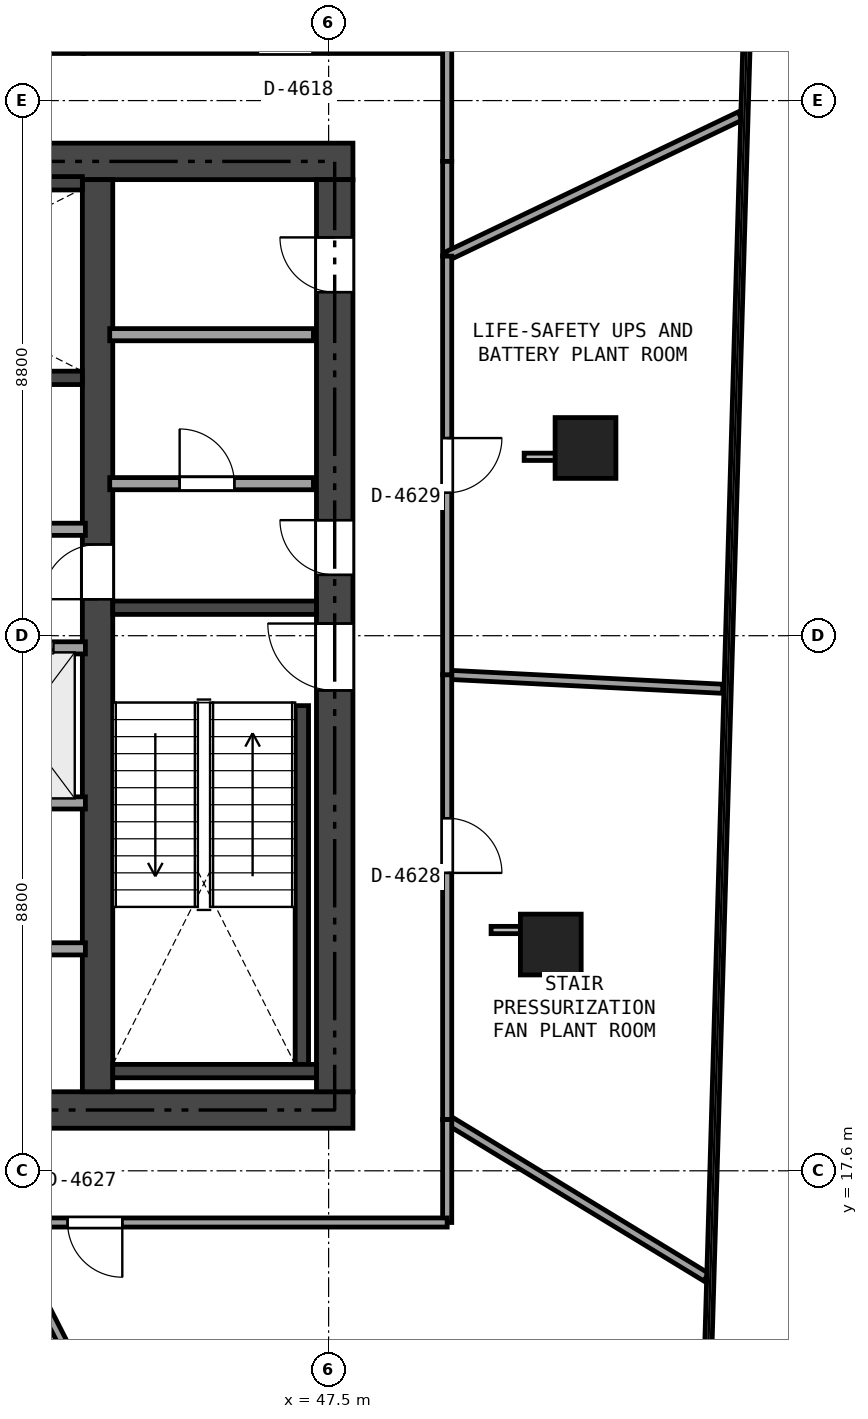
"""IFC4 building model, lengths in metres.
Left out: names, types, materials, properties, quantities, classifications, styles, units other than length and angle.
Written with IfcOpenShell. Run it as: python <this file> out.ifc"""

import sys

from ifc_helpers import new_model, si_unit, direction, frame, frame_2d, origin, origin_2d, place, context, subcontext, project, spatial, rectangle, extrude, element, fill, save


model = new_model("IFC4")
c1 = context("Model", 3, precision=1e-05, world=origin(), true_north=direction((0.0, 1.0)))
c2 = subcontext(c1, "Body", "Model", "MODEL_VIEW")
j1 = project(units=[si_unit("LENGTHUNIT", "METRE"), si_unit("PLANEANGLEUNIT", "RADIAN")], contexts=[c1])
p1 = place(None, origin())
s1 = spatial("IfcSite", under=j1, at=p1, CompositionType="ELEMENT")
p2 = place(p1, origin())
s2 = spatial("IfcBuilding", under=s1, at=p2, CompositionType="ELEMENT")
p3 = place(p2, frame((0.0, 0.0, 172.5)))
s3 = spatial("IfcBuildingStorey", under=s2, at=p3, CompositionType="ELEMENT", Elevation=172.5)
p4 = place(p3, frame((26.5, 18.6, 0.0), z_axis=(0.0, 0.0, 1.0), x_axis=(1.0, 0.0, 0.0)))
e1 = element("IfcWall", 1, at=p4, inside=s3, PredefinedType="SHEAR", context=c2, shape_type="SweptSolid", body=[
    extrude(rectangle(XDim=21.4, YDim=0.6, at=frame_2d((10.7, 0.0))), origin(), (0.0, 0.0, 1.0), 4.08),
])
p5 = place(p4, frame((12.425, 0.0, 0.0)))
e2 = element("IfcOpeningElement", 2, at=p5, cuts=e1, PredefinedType="OPENING", context=c2, shape_type="SweptSolid", body=[
    extrude(rectangle(XDim=1.15, YDim=2.15, at=frame_2d((0.575, 1.075))), frame((0.0, 0.31, 0.0), z_axis=(0.0, -1.0, 0.0), x_axis=(1.0, 0.0, 0.0)), (0.0, 0.0, 1.0), 0.62),
])
p6 = place(p4, frame((5.25, 0.0, 0.0)))
e3 = element("IfcOpeningElement", 3, at=p6, cuts=e1, PredefinedType="OPENING", context=c2, shape_type="SweptSolid", body=[
    extrude(rectangle(XDim=0.9, YDim=2.1, at=frame_2d((0.45, 1.05))), frame((0.0, 0.31, 0.0), z_axis=(0.0, -1.0, 0.0), x_axis=(1.0, 0.0, 0.0)), (0.0, 0.0, 1.0), 0.62),
])
p7 = place(p3, frame((26.5, 34.2, 0.0), z_axis=(0.0, 0.0, 1.0), x_axis=(1.0, 0.0, 0.0)))
e4 = element("IfcWall", 4, at=p7, inside=s3, PredefinedType="SHEAR", context=c2, shape_type="SweptSolid", body=[
    extrude(rectangle(XDim=21.4, YDim=0.6, at=frame_2d((10.7, 0.0))), origin(), (0.0, 0.0, 1.0), 4.08),
])
p8 = place(p7, frame((9.7, 0.0, 0.0)))
e5 = element("IfcOpeningElement", 5, at=p8, cuts=e4, PredefinedType="OPENING", context=c2, shape_type="SweptSolid", body=[
    extrude(rectangle(XDim=1.1, YDim=2.15, at=frame_2d((0.55, 1.075))), frame((0.0, 0.31, 0.0), z_axis=(0.0, -1.0, 0.0), x_axis=(1.0, 0.0, 0.0)), (0.0, 0.0, 1.0), 0.62),
])
p9 = place(p7, frame((1.95, 0.0, 0.0)))
e6 = element("IfcOpeningElement", 6, at=p9, cuts=e4, PredefinedType="OPENING", context=c2, shape_type="SweptSolid", body=[
    extrude(rectangle(XDim=0.9, YDim=2.1, at=frame_2d((0.45, 1.05))), frame((0.0, 0.31, 0.0), z_axis=(0.0, -1.0, 0.0), x_axis=(1.0, 0.0, 0.0)), (0.0, 0.0, 1.0), 0.62),
])
p10 = place(p7, frame((6.25, 0.0, 0.0)))
e7 = element("IfcOpeningElement", 7, at=p10, cuts=e4, PredefinedType="OPENING", context=c2, shape_type="SweptSolid", body=[
    extrude(rectangle(XDim=0.9, YDim=2.1, at=frame_2d((0.45, 1.05))), frame((0.0, 0.31, 0.0), z_axis=(0.0, -1.0, 0.0), x_axis=(1.0, 0.0, 0.0)), (0.0, 0.0, 1.0), 0.62),
])
p11 = place(p3, frame((47.6, 18.9, 0.0), z_axis=(0.0, 0.0, 1.0), x_axis=(0.0, 1.0, 0.0)))
e8 = element("IfcWall", 8, at=p11, inside=s3, PredefinedType="SHEAR", context=c2, shape_type="SweptSolid", body=[
    extrude(rectangle(XDim=15.0, YDim=0.6, at=frame_2d((7.5, 0.0))), origin(), (0.0, 0.0, 1.0), 4.08),
])
p12 = place(p11, frame((6.6, 0.0, 0.0)))
e9 = element("IfcOpeningElement", 9, at=p12, cuts=e8, PredefinedType="OPENING", context=c2, shape_type="SweptSolid", body=[
    extrude(rectangle(XDim=1.1, YDim=2.15, at=frame_2d((0.55, 1.075))), frame((0.0, 0.31, 0.0), z_axis=(0.0, -1.0, 0.0), x_axis=(1.0, 0.0, 0.0)), (0.0, 0.0, 1.0), 0.62),
])
p13 = place(p11, frame((8.5, 0.0, 0.0)))
e10 = element("IfcOpeningElement", 10, at=p13, cuts=e8, PredefinedType="OPENING", context=c2, shape_type="SweptSolid", body=[
    extrude(rectangle(XDim=0.9, YDim=2.1, at=frame_2d((0.45, 1.05))), frame((0.0, 0.31, 0.0), z_axis=(0.0, -1.0, 0.0), x_axis=(1.0, 0.0, 0.0)), (0.0, 0.0, 1.0), 0.62),
])
p14 = place(p11, frame((13.15, 0.0, 0.0)))
e11 = element("IfcOpeningElement", 11, at=p14, cuts=e8, PredefinedType="OPENING", context=c2, shape_type="SweptSolid", body=[
    extrude(rectangle(XDim=0.9, YDim=2.1, at=frame_2d((0.45, 1.05))), frame((0.0, 0.31, 0.0), z_axis=(0.0, -1.0, 0.0), x_axis=(1.0, 0.0, 0.0)), (0.0, 0.0, 1.0), 0.62),
])
p15 = place(p3, frame((43.7, 18.9, 0.0), z_axis=(0.0, 0.0, 1.0), x_axis=(0.0, 1.0, 0.0)))
e12 = element("IfcWall", 12, at=p15, inside=s3, PredefinedType="SHEAR", context=c2, shape_type="SweptSolid", body=[
    extrude(rectangle(XDim=15.0, YDim=0.5, at=frame_2d((7.5, 0.0))), origin(), (0.0, 0.0, 1.0), 4.08),
])
p16 = place(p15, frame((8.1, 0.0, 0.0)))
e13 = element("IfcOpeningElement", 13, at=p16, cuts=e12, PredefinedType="OPENING", context=c2, shape_type="SweptSolid", body=[
    extrude(rectangle(XDim=0.9, YDim=2.1, at=frame_2d((0.45, 1.05))), frame((0.0, 0.26, 0.0), z_axis=(0.0, -1.0, 0.0), x_axis=(1.0, 0.0, 0.0)), (0.0, 0.0, 1.0), 0.52),
])
p17 = place(p3, frame((43.95, 26.86, 0.0), z_axis=(0.0, 0.0, 1.0), x_axis=(1.0, 0.0, 0.0)))
e14 = element("IfcWall", 14, at=p17, inside=s3, PredefinedType="SHEAR", context=c2, shape_type="SweptSolid", body=[
    extrude(rectangle(XDim=3.35, YDim=0.22, at=frame_2d((1.675, 0.0))), origin(), (0.0, 0.0, 1.0), 4.08),
])
p18 = place(p3, frame((47.06, 19.35, 0.0), z_axis=(0.0, 0.0, 1.0), x_axis=(0.0, 1.0, 0.0)))
e15 = element("IfcWall", 15, at=p18, inside=s3, PredefinedType="SHEAR", context=c2, shape_type="SweptSolid", body=[
    extrude(rectangle(XDim=5.9, YDim=0.22, at=frame_2d((2.95, 0.0))), origin(), (0.0, 0.0, 1.0), 4.08),
])
p19 = place(p3, frame((43.95, 19.24, 0.0), z_axis=(0.0, 0.0, 1.0), x_axis=(1.0, 0.0, 0.0)))
e16 = element("IfcWall", 16, at=p19, inside=s3, PredefinedType="SHEAR", context=c2, shape_type="SweptSolid", body=[
    extrude(rectangle(XDim=3.35, YDim=0.22, at=frame_2d((1.675, 0.0))), origin(), (0.0, 0.0, 1.0), 4.08),
])
p20 = place(p3, frame((35.84, 30.64, 0.0), z_axis=(0.0, 0.0, 1.0), x_axis=(1.0, 0.0, 0.0)))
e17 = element("IfcWall", 17, at=p20, inside=s3, PredefinedType="SHEAR", context=c2, shape_type="SweptSolid", body=[
    extrude(rectangle(XDim=7.61, YDim=0.22, at=frame_2d((3.805, 0.0))), origin(), (0.0, 0.0, 1.0), 4.08),
])
p21 = place(p3, frame((37.55, 33.84, 0.0), z_axis=(0.0, 0.0, 1.0), x_axis=(1.0, 0.0, 0.0)))
e18 = element("IfcWall", 18, at=p21, inside=s3, PredefinedType="SHEAR", context=c2, shape_type="SweptSolid", body=[
    extrude(rectangle(XDim=5.9, YDim=0.22, at=frame_2d((2.95, 0.0))), origin(), (0.0, 0.0, 1.0), 4.08),
])
for number, where, z_axis, x_axis in (
    (19, (51.725, 29.487, 0.0), (0.0, 0.0, 1.0), (1.0, 0.0, 0.0)),
    (20, (51.154, 21.321, 0.0), (0.0, 0.0, 1.0), (1.0, 0.0, 0.0)),
):
    element("IfcColumn", number, at=place(p3, frame(where, z_axis=z_axis, x_axis=x_axis)), inside=s3, PredefinedType="COLUMN", context=c2, shape_type="SweptSolid", body=[
        extrude(rectangle(XDim=1.0, YDim=1.0, at=origin_2d()), origin(), (0.0, 0.0, 1.0), 4.08),
    ])
p22 = place(p3, frame((43.9, 28.9, 0.0), z_axis=(0.0, 0.0, 1.0), x_axis=(1.0, 0.0, 0.0)))
e21 = element("IfcWall", 21, at=p22, inside=s3, PredefinedType="SOLIDWALL", context=c2, shape_type="SweptSolid", body=[
    extrude(rectangle(XDim=3.35, YDim=0.2, at=frame_2d((1.675, 0.0))), origin(), (0.0, 0.0, 1.0), 4.08),
])
p23 = place(p22, frame((1.15, 0.0, 0.0)))
e22 = element("IfcOpeningElement", 22, at=p23, cuts=e21, PredefinedType="OPENING", context=c2, shape_type="SweptSolid", body=[
    extrude(rectangle(XDim=0.9, YDim=2.1, at=frame_2d((0.45, 1.05))), frame((0.0, 0.11, 0.0), z_axis=(0.0, -1.0, 0.0), x_axis=(1.0, 0.0, 0.0)), (0.0, 0.0, 1.0), 0.22),
])
p24 = place(p3, frame((43.9, 31.35, 0.0), z_axis=(0.0, 0.0, 1.0), x_axis=(1.0, 0.0, 0.0)))
e23 = element("IfcWall", 23, at=p24, inside=s3, PredefinedType="SOLIDWALL", context=c2, shape_type="SweptSolid", body=[
    extrude(rectangle(XDim=3.35, YDim=0.2, at=frame_2d((1.675, 0.0))), origin(), (0.0, 0.0, 1.0), 4.08),
])
p25 = place(p3, frame((35.62, 28.15, 0.0), z_axis=(0.0, 0.0, 1.0), x_axis=(1.0, 0.0, 0.0)))
e24 = element("IfcWall", 24, at=p25, inside=s3, PredefinedType="SOLIDWALL", context=c2, shape_type="SweptSolid", body=[
    extrude(rectangle(XDim=7.88, YDim=0.2, at=frame_2d((3.94, 0.0))), origin(), (0.0, 0.0, 1.0), 4.08),
])
p26 = place(p3, frame((35.62, 26.2, 0.0), z_axis=(0.0, 0.0, 1.0), x_axis=(1.0, 0.0, 0.0)))
e25 = element("IfcWall", 25, at=p26, inside=s3, PredefinedType="SOLIDWALL", context=c2, shape_type="SweptSolid", body=[
    extrude(rectangle(XDim=7.88, YDim=0.2, at=frame_2d((3.94, 0.0))), origin(), (0.0, 0.0, 1.0), 4.08),
])
p27 = place(p26, frame((0.405, 0.0, 0.0)))
e26 = element("IfcOpeningElement", 26, at=p27, cuts=e25, PredefinedType="OPENING", context=c2, shape_type="SweptSolid", body=[
    extrude(rectangle(XDim=1.1, YDim=2.15, at=frame_2d((0.55, 1.075))), frame((0.0, 0.11, 0.0), z_axis=(0.0, -1.0, 0.0), x_axis=(1.0, 0.0, 0.0)), (0.0, 0.0, 1.0), 0.22),
])
p28 = place(p26, frame((2.355, 0.0, 0.0)))
e27 = element("IfcOpeningElement", 27, at=p28, cuts=e25, PredefinedType="OPENING", context=c2, shape_type="SweptSolid", body=[
    extrude(rectangle(XDim=1.1, YDim=2.15, at=frame_2d((0.55, 1.075))), frame((0.0, 0.11, 0.0), z_axis=(0.0, -1.0, 0.0), x_axis=(1.0, 0.0, 0.0)), (0.0, 0.0, 1.0), 0.22),
])
p29 = place(p26, frame((4.305, 0.0, 0.0)))
e28 = element("IfcOpeningElement", 28, at=p29, cuts=e25, PredefinedType="OPENING", context=c2, shape_type="SweptSolid", body=[
    extrude(rectangle(XDim=1.1, YDim=2.15, at=frame_2d((0.55, 1.075))), frame((0.0, 0.11, 0.0), z_axis=(0.0, -1.0, 0.0), x_axis=(1.0, 0.0, 0.0)), (0.0, 0.0, 1.0), 0.22),
])
p30 = place(p26, frame((6.255, 0.0, 0.0)))
e29 = element("IfcOpeningElement", 29, at=p30, cuts=e25, PredefinedType="OPENING", context=c2, shape_type="SweptSolid", body=[
    extrude(rectangle(XDim=1.1, YDim=2.15, at=frame_2d((0.55, 1.075))), frame((0.0, 0.11, 0.0), z_axis=(0.0, -1.0, 0.0), x_axis=(1.0, 0.0, 0.0)), (0.0, 0.0, 1.0), 0.22),
])
p31 = place(p3, frame((35.62, 23.65, 0.0), z_axis=(0.0, 0.0, 1.0), x_axis=(1.0, 0.0, 0.0)))
e30 = element("IfcWall", 30, at=p31, inside=s3, PredefinedType="SOLIDWALL", context=c2, shape_type="SweptSolid", body=[
    extrude(rectangle(XDim=7.88, YDim=0.2, at=frame_2d((3.94, 0.0))), origin(), (0.0, 0.0, 1.0), 3.601),
])
p32 = place(p3, frame((35.62, 21.25, 0.0), z_axis=(0.0, 0.0, 1.0), x_axis=(1.0, 0.0, 0.0)))
e31 = element("IfcWall", 31, at=p32, inside=s3, PredefinedType="SOLIDWALL", context=c2, shape_type="SweptSolid", body=[
    extrude(rectangle(XDim=7.88, YDim=0.2, at=frame_2d((3.94, 0.0))), origin(), (0.0, 0.0, 1.0), 4.08),
])
p33 = place(p32, frame((1.13, 0.0, 0.0)))
e32 = element("IfcOpeningElement", 32, at=p33, cuts=e31, PredefinedType="OPENING", context=c2, shape_type="SweptSolid", body=[
    extrude(rectangle(XDim=0.9, YDim=2.1, at=frame_2d((0.45, 1.05))), frame((0.0, 0.11, 0.0), z_axis=(0.0, -1.0, 0.0), x_axis=(1.0, 0.0, 0.0)), (0.0, 0.0, 1.0), 0.22),
])
p34 = place(p32, frame((5.73, 0.0, 0.0)))
e33 = element("IfcOpeningElement", 33, at=p34, cuts=e31, PredefinedType="OPENING", context=c2, shape_type="SweptSolid", body=[
    extrude(rectangle(XDim=0.9, YDim=2.1, at=frame_2d((0.45, 1.05))), frame((0.0, 0.11, 0.0), z_axis=(0.0, -1.0, 0.0), x_axis=(1.0, 0.0, 0.0)), (0.0, 0.0, 1.0), 0.22),
])
p35 = place(p3, frame((43.467, 36.05, 0.0), z_axis=(0.0, 0.0, 1.0), x_axis=(1.0, 0.0, 0.0)))
e34 = element("IfcWall", 34, at=p35, inside=s3, PredefinedType="PARTITIONING", context=c2, shape_type="SweptSolid", body=[
    extrude(rectangle(XDim=5.983, YDim=0.15, at=frame_2d((2.991, 0.0))), origin(), (0.0, 0.0, 1.0), 3.065),
])
p36 = place(p35, frame((2.87, 0.0, 0.0)))
e35 = element("IfcOpeningElement", 35, at=p36, cuts=e34, PredefinedType="OPENING", context=c2, shape_type="SweptSolid", body=[
    extrude(rectangle(XDim=0.9, YDim=2.0, at=frame_2d((0.45, 1.0))), frame((0.0, 0.085, 0.0), z_axis=(0.0, -1.0, 0.0), x_axis=(1.0, 0.0, 0.0)), (0.0, 0.0, 1.0), 0.17),
])
p37 = place(p3, frame((49.45, 36.05, 0.0), z_axis=(0.0, 0.0, 1.0), x_axis=(0.0, -1.0, 0.0)))
e36 = element("IfcWall", 36, at=p37, inside=s3, PredefinedType="PARTITIONING", context=c2, shape_type="SweptSolid", body=[
    extrude(rectangle(XDim=1.85, YDim=0.15, at=frame_2d((0.925, 0.0))), origin(), (0.0, 0.0, 1.0), 4.08),
])
p38 = place(p3, frame((49.45, 34.2, 0.0), z_axis=(0.0, 0.0, 1.0), x_axis=(0.0, -1.0, 0.0)))
e37 = element("IfcWall", 37, at=p38, inside=s3, PredefinedType="PARTITIONING", context=c2, shape_type="SweptSolid", body=[
    extrude(rectangle(XDim=1.558, YDim=0.15, at=frame_2d((0.779, 0.0))), origin(), (0.0, 0.0, 1.0), 3.565),
])
p39 = place(p3, frame((49.45, 32.642, 0.0), z_axis=(0.0, 0.0, 1.0), x_axis=(0.902160522938, 0.431400499365, 0.0)))
e38 = element("IfcWall", 38, at=p39, inside=s3, PredefinedType="PARTITIONING", context=c2, shape_type="SweptSolid", body=[
    extrude(rectangle(XDim=5.341, YDim=0.15, at=frame_2d((2.67, 0.0))), origin(), (0.0, 0.0, 1.0), 3.565),
])
p40 = place(p3, frame((37.706, 36.05, 0.0), z_axis=(0.0, 0.0, 1.0), x_axis=(1.0, 0.0, 0.0)))
e39 = element("IfcWall", 39, at=p40, inside=s3, PredefinedType="PARTITIONING", context=c2, shape_type="SweptSolid", body=[
    extrude(rectangle(XDim=5.761, YDim=0.15, at=frame_2d((2.88, 0.0))), origin(), (0.0, 0.0, 1.0), 3.601),
])
p41 = place(p40, frame((2.43, 0.0, 0.0)))
e40 = element("IfcOpeningElement", 40, at=p41, cuts=e39, PredefinedType="OPENING", context=c2, shape_type="SweptSolid", body=[
    extrude(rectangle(XDim=0.9, YDim=2.0, at=frame_2d((0.45, 1.0))), frame((0.0, 0.085, 0.0), z_axis=(0.0, -1.0, 0.0), x_axis=(1.0, 0.0, 0.0)), (0.0, 0.0, 1.0), 0.17),
])
p42 = place(p3, frame((47.435, 6.327, 0.0), z_axis=(0.0, 0.0, 1.0), x_axis=(-0.454484531482, 0.890754629875, 0.0)))
e41 = element("IfcWall", 41, at=p42, inside=s3, PredefinedType="PARTITIONING", context=c2, shape_type="SweptSolid", body=[
    extrude(rectangle(XDim=11.701, YDim=0.15, at=frame_2d((5.851, 0.0))), origin(), (0.0, 0.0, 1.0), 3.565),
])
p43 = place(p3, frame((53.709, 15.852, 0.0), z_axis=(0.0, 0.0, 1.0), x_axis=(-0.8541484412, 0.520029268787, 0.0)))
e42 = element("IfcWall", 42, at=p43, inside=s3, PredefinedType="PARTITIONING", context=c2, shape_type="SweptSolid", body=[
    extrude(rectangle(XDim=4.986, YDim=0.15, at=frame_2d((2.493, 0.0))), origin(), (0.0, 0.0, 1.0), 4.08),
])
p44 = place(p3, frame((49.45, 18.445, 0.0), z_axis=(0.0, 0.0, 1.0), x_axis=(0.0, -1.0, 0.0)))
e43 = element("IfcWall", 43, at=p44, inside=s3, PredefinedType="PARTITIONING", context=c2, shape_type="SweptSolid", body=[
    extrude(rectangle(XDim=1.695, YDim=0.15, at=frame_2d((0.848, 0.0))), origin(), (0.0, 0.0, 1.0), 4.08),
])
p45 = place(p3, frame((49.45, 16.75, 0.0), z_axis=(0.0, 0.0, 1.0), x_axis=(-1.0, 0.0, 0.0)))
e44 = element("IfcWall", 44, at=p45, inside=s3, PredefinedType="PARTITIONING", context=c2, shape_type="SweptSolid", body=[
    extrude(rectangle(XDim=7.333, YDim=0.15, at=frame_2d((3.667, 0.0))), origin(), (0.0, 0.0, 1.0), 3.565),
])
p46 = place(p45, frame((5.343, 0.0, 0.0)))
e45 = element("IfcOpeningElement", 45, at=p46, cuts=e44, PredefinedType="OPENING", context=c2, shape_type="SweptSolid", body=[
    extrude(rectangle(XDim=0.9, YDim=2.0, at=frame_2d((0.45, 1.0))), frame((0.0, 0.085, 0.0), z_axis=(0.0, -1.0, 0.0), x_axis=(1.0, 0.0, 0.0)), (0.0, 0.0, 1.0), 0.17),
])
p47 = place(p3, frame((53.982, 25.527, 0.0), z_axis=(0.0, 0.0, 1.0), x_axis=(-0.998703982014, 0.050895543123, 0.0)))
e46 = element("IfcWall", 46, at=p47, inside=s3, PredefinedType="PARTITIONING", context=c2, shape_type="SweptSolid", body=[
    extrude(rectangle(XDim=4.538, YDim=0.15, at=frame_2d((2.269, 0.0))), origin(), (0.0, 0.0, 1.0), 3.565),
])
p48 = place(p3, frame((49.45, 25.758, 0.0), z_axis=(0.0, 0.0, 1.0), x_axis=(0.0, -1.0, 0.0)))
e47 = element("IfcWall", 47, at=p48, inside=s3, PredefinedType="PARTITIONING", context=c2, shape_type="SweptSolid", body=[
    extrude(rectangle(XDim=7.313, YDim=0.15, at=frame_2d((3.656, 0.0))), origin(), (0.0, 0.0, 1.0), 3.065),
])
p49 = place(p48, frame((2.359, 0.0, 0.0)))
e48 = element("IfcOpeningElement", 48, at=p49, cuts=e47, PredefinedType="OPENING", context=c2, shape_type="SweptSolid", body=[
    extrude(rectangle(XDim=0.9, YDim=2.0, at=frame_2d((0.45, 1.0))), frame((0.0, 0.085, 0.0), z_axis=(0.0, -1.0, 0.0), x_axis=(1.0, 0.0, 0.0)), (0.0, 0.0, 1.0), 0.17),
])
p50 = place(p3, frame((49.45, 32.642, 0.0), z_axis=(0.0, 0.0, 1.0), x_axis=(0.0, -1.0, 0.0)))
e49 = element("IfcWall", 49, at=p50, inside=s3, PredefinedType="PARTITIONING", context=c2, shape_type="SweptSolid", body=[
    extrude(rectangle(XDim=6.884, YDim=0.15, at=frame_2d((3.442, 0.0))), origin(), (0.0, 0.0, 1.0), 3.065),
])
p51 = place(p50, frame((2.992, 0.0, 0.0)))
e50 = element("IfcOpeningElement", 50, at=p51, cuts=e49, PredefinedType="OPENING", context=c2, shape_type="SweptSolid", body=[
    extrude(rectangle(XDim=0.9, YDim=2.0, at=frame_2d((0.45, 1.0))), frame((0.0, 0.085, 0.0), z_axis=(0.0, -1.0, 0.0), x_axis=(1.0, 0.0, 0.0)), (0.0, 0.0, 1.0), 0.17),
])
p52 = place(p12, origin())
e51 = element("IfcDoor", 51, at=p52, inside=s3, OperationType="SINGLE_SWING_RIGHT", PredefinedType="DOOR", context=c2, shape_type="SweptSolid", body=[
    extrude(rectangle(XDim=1.1, YDim=2.15, at=frame_2d((0.55, 1.075))), frame((0.0, 0.025, 0.0), z_axis=(0.0, -1.0, 0.0), x_axis=(1.0, 0.0, 0.0)), (0.0, 0.0, 1.0), 0.05),
])
fill(e9, e51)
p53 = place(p16, origin())
e52 = element("IfcDoor", 52, at=p53, inside=s3, OperationType="SINGLE_SWING_LEFT", PredefinedType="DOOR", context=c2, shape_type="SweptSolid", body=[
    extrude(rectangle(XDim=0.9, YDim=2.1, at=frame_2d((0.45, 1.05))), frame((0.0, 0.025, 0.0), z_axis=(0.0, -1.0, 0.0), x_axis=(1.0, 0.0, 0.0)), (0.0, 0.0, 1.0), 0.05),
])
fill(e13, e52)
p54 = place(p13, origin())
e53 = element("IfcDoor", 53, at=p54, inside=s3, OperationType="SINGLE_SWING_RIGHT", PredefinedType="DOOR", context=c2, shape_type="SweptSolid", body=[
    extrude(rectangle(XDim=0.9, YDim=2.1, at=frame_2d((0.45, 1.05))), frame((0.0, 0.025, 0.0), z_axis=(0.0, -1.0, 0.0), x_axis=(1.0, 0.0, 0.0)), (0.0, 0.0, 1.0), 0.05),
])
fill(e10, e53)
p55 = place(p23, origin())
e54 = element("IfcDoor", 54, at=p55, inside=s3, OperationType="SINGLE_SWING_LEFT", PredefinedType="DOOR", context=c2, shape_type="SweptSolid", body=[
    extrude(rectangle(XDim=0.9, YDim=2.1, at=frame_2d((0.45, 1.05))), frame((0.0, 0.025, 0.0), z_axis=(0.0, -1.0, 0.0), x_axis=(1.0, 0.0, 0.0)), (0.0, 0.0, 1.0), 0.05),
])
fill(e22, e54)
p56 = place(p14, origin())
e55 = element("IfcDoor", 55, at=p56, inside=s3, OperationType="SINGLE_SWING_RIGHT", PredefinedType="DOOR", context=c2, shape_type="SweptSolid", body=[
    extrude(rectangle(XDim=0.9, YDim=2.1, at=frame_2d((0.45, 1.05))), frame((0.0, 0.025, 0.0), z_axis=(0.0, -1.0, 0.0), x_axis=(1.0, 0.0, 0.0)), (0.0, 0.0, 1.0), 0.05),
])
fill(e11, e55)
p57 = place(p30, origin())
e56 = element("IfcDoor", 56, at=p57, inside=s3, OperationType="SLIDING_TO_LEFT", PredefinedType="DOOR", context=c2, shape_type="SweptSolid", body=[
    extrude(rectangle(XDim=1.1, YDim=2.15, at=frame_2d((0.55, 1.075))), frame((0.0, 0.025, 0.0), z_axis=(0.0, -1.0, 0.0), x_axis=(1.0, 0.0, 0.0)), (0.0, 0.0, 1.0), 0.05),
])
fill(e29, e56)
p58 = place(p46, origin())
e57 = element("IfcDoor", 57, at=p58, inside=s3, OperationType="SINGLE_SWING_LEFT", PredefinedType="DOOR", context=c2, shape_type="SweptSolid", body=[
    extrude(rectangle(XDim=0.9, YDim=2.0, at=frame_2d((0.45, 1.0))), frame((0.0, 0.025, 0.0), z_axis=(0.0, -1.0, 0.0), x_axis=(1.0, 0.0, 0.0)), (0.0, 0.0, 1.0), 0.05),
])
fill(e45, e57)
p59 = place(p49, origin())
e58 = element("IfcDoor", 58, at=p59, inside=s3, OperationType="SINGLE_SWING_RIGHT", PredefinedType="DOOR", context=c2, shape_type="SweptSolid", body=[
    extrude(rectangle(XDim=0.9, YDim=2.0, at=frame_2d((0.45, 1.0))), frame((0.0, 0.025, 0.0), z_axis=(0.0, -1.0, 0.0), x_axis=(1.0, 0.0, 0.0)), (0.0, 0.0, 1.0), 0.05),
])
fill(e48, e58)
p60 = place(p51, origin())
e59 = element("IfcDoor", 59, at=p60, inside=s3, OperationType="SINGLE_SWING_LEFT", PredefinedType="DOOR", context=c2, shape_type="SweptSolid", body=[
    extrude(rectangle(XDim=0.9, YDim=2.0, at=frame_2d((0.45, 1.0))), frame((0.0, 0.025, 0.0), z_axis=(0.0, -1.0, 0.0), x_axis=(1.0, 0.0, 0.0)), (0.0, 0.0, 1.0), 0.05),
])
fill(e50, e59)
save(model, sys.argv[1])
